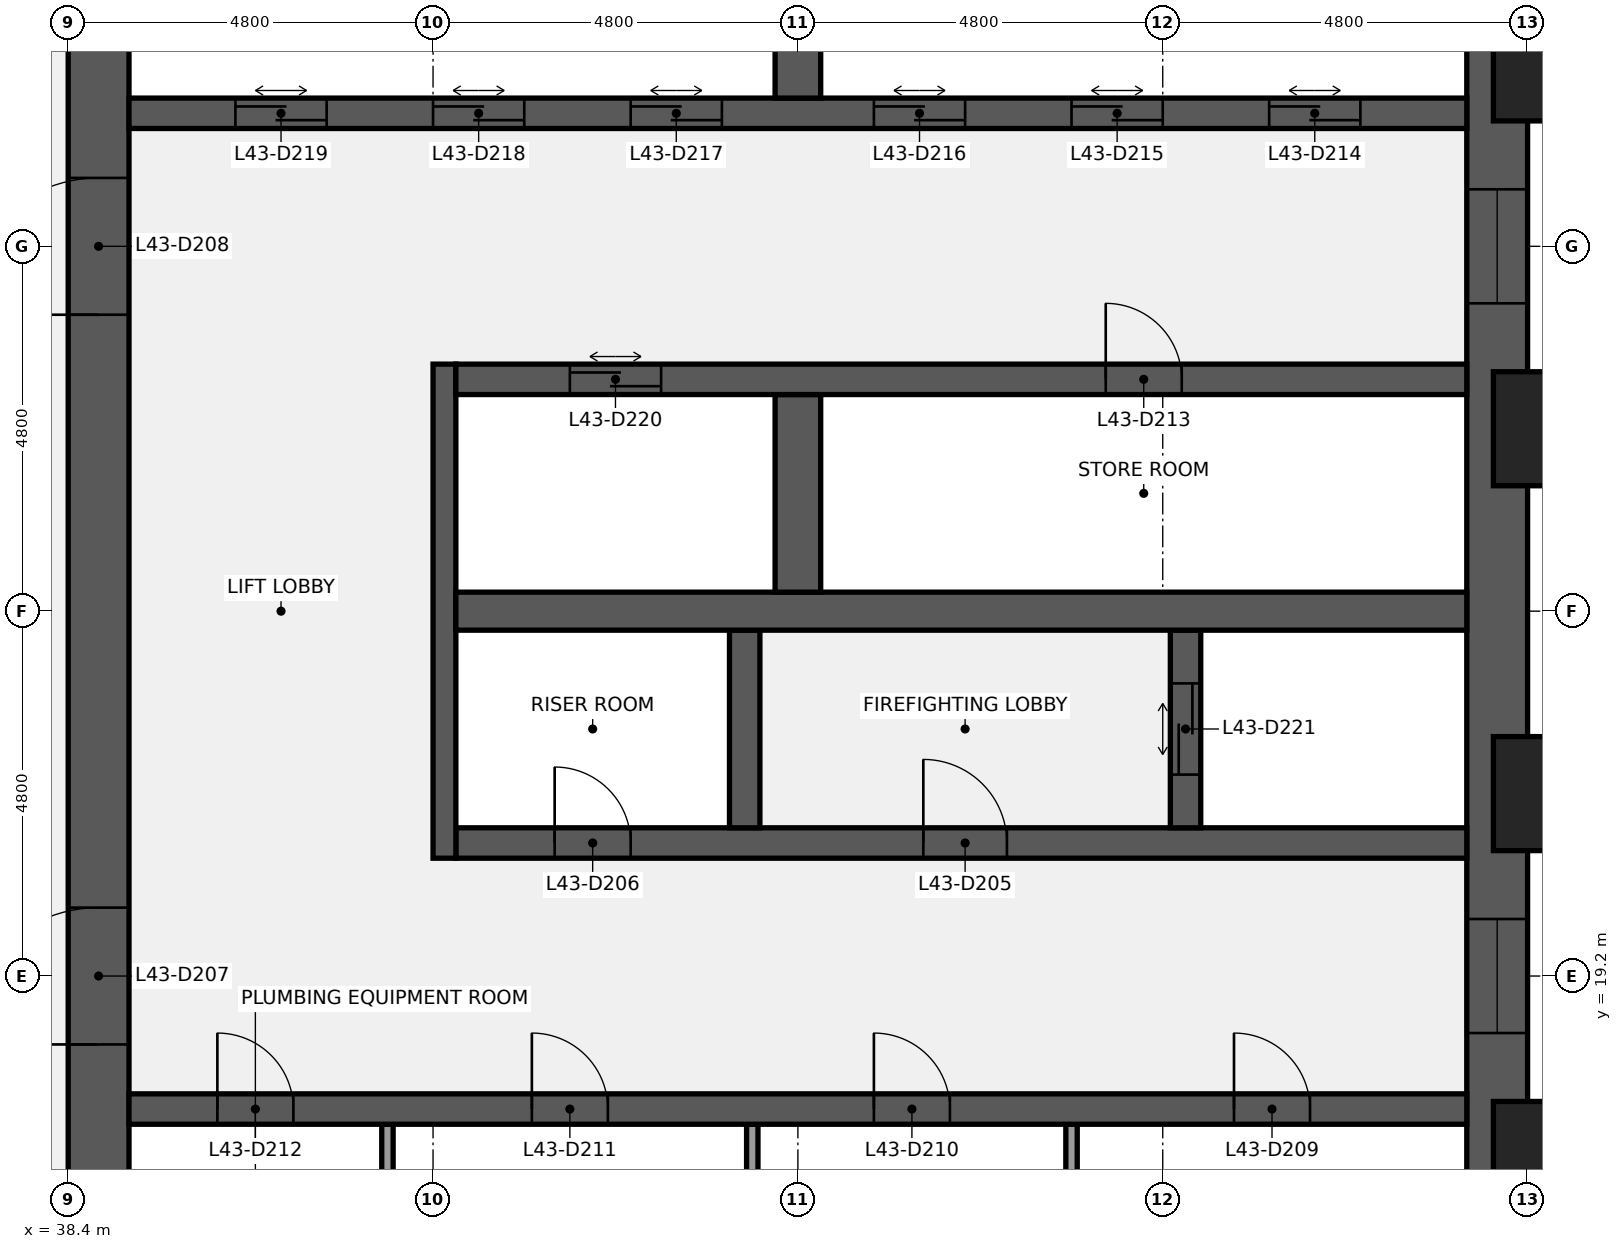
"""IFC4 building model, lengths in metres.
Left out: names, types, materials, properties, quantities, classifications, styles, units other than length and angle.
Written with IfcOpenShell. Run it as: python <this file> out.ifc"""

import sys

from ifc_helpers import new_model, si_unit, direction, frame, frame_2d, origin, origin_2d, place, context, subcontext, project, spatial, rectangle, extrude, element, fill, save


model = new_model("IFC4")
c1 = context("Model", 3, precision=1e-05, world=origin(), true_north=direction((0.0, 1.0)))
c2 = subcontext(c1, "Body", "Model", "MODEL_VIEW")
j1 = project(units=[si_unit("LENGTHUNIT", "METRE"), si_unit("PLANEANGLEUNIT", "RADIAN")], contexts=[c1])
p1 = place(None, origin())
s1 = spatial("IfcSite", under=j1, at=p1, CompositionType="ELEMENT")
p2 = place(p1, origin())
s2 = spatial("IfcBuilding", under=s1, at=p2, CompositionType="ELEMENT")
p3 = place(p2, frame((0.0, 0.0, 201.2)))
s3 = spatial("IfcBuildingStorey", under=s2, at=p3, CompositionType="ELEMENT", Elevation=201.2)
p4 = place(p3, frame((57.2, 38.4, 0.0), z_axis=(0.0, 0.0, 1.0), x_axis=(0.0, -1.0, 0.0)))
e1 = element("IfcWall", 1, at=p4, inside=s3, PredefinedType="SHEAR", context=c2, shape_type="SweptSolid", body=[
    extrude(rectangle(XDim=28.8, YDim=0.8, at=frame_2d((14.4, 0.0))), origin(), (0.0, 0.0, 1.0), 3.84),
])
p5 = place(p4, frame((18.45, 0.0, 0.9)))
e2 = element("IfcOpeningElement", 2, at=p5, cuts=e1, PredefinedType="OPENING", context=c2, shape_type="SweptSolid", body=[
    extrude(rectangle(XDim=1.5, YDim=1.5, at=frame_2d((0.75, 0.75))), frame((0.0, 0.41, 0.0), z_axis=(0.0, -1.0, 0.0), x_axis=(1.0, 0.0, 0.0)), (0.0, 0.0, 1.0), 0.82),
])
p6 = place(p4, frame((8.85, 0.0, 0.9)))
e3 = element("IfcOpeningElement", 3, at=p6, cuts=e1, PredefinedType="OPENING", context=c2, shape_type="SweptSolid", body=[
    extrude(rectangle(XDim=1.5, YDim=1.5, at=frame_2d((0.75, 0.75))), frame((0.0, 0.41, 0.0), z_axis=(0.0, -1.0, 0.0), x_axis=(1.0, 0.0, 0.0)), (0.0, 0.0, 1.0), 0.82),
])
p7 = place(p3, frame((38.8, 9.6, 0.0), z_axis=(0.0, 0.0, 1.0), x_axis=(0.0, 1.0, 0.0)))
e4 = element("IfcWall", 4, at=p7, inside=s3, PredefinedType="SHEAR", context=c2, shape_type="SweptSolid", body=[
    extrude(rectangle(XDim=28.8, YDim=0.8, at=frame_2d((14.4, 0.0))), origin(), (0.0, 0.0, 1.0), 3.84),
])
p8 = place(p7, frame((8.7, 0.0, 0.0)))
e5 = element("IfcOpeningElement", 5, at=p8, cuts=e4, PredefinedType="OPENING", context=c2, shape_type="SweptSolid", body=[
    extrude(rectangle(XDim=1.8, YDim=2.1, at=frame_2d((0.9, 1.05))), frame((0.0, 0.41, 0.0), z_axis=(0.0, -1.0, 0.0), x_axis=(1.0, 0.0, 0.0)), (0.0, 0.0, 1.0), 0.82),
])
p9 = place(p7, frame((18.3, 0.0, 0.0)))
e6 = element("IfcOpeningElement", 6, at=p9, cuts=e4, PredefinedType="OPENING", context=c2, shape_type="SweptSolid", body=[
    extrude(rectangle(XDim=1.8, YDim=2.1, at=frame_2d((0.9, 1.05))), frame((0.0, 0.41, 0.0), z_axis=(0.0, -1.0, 0.0), x_axis=(1.0, 0.0, 0.0)), (0.0, 0.0, 1.0), 0.82),
])
for number, where, z_axis, x_axis in (
    (7, (51.6, 14.65, 0.0), (0.0, 0.0, 1.0), (0.0, 1.0, 0.0)),
    (8, (47.4, 14.65, 0.0), (0.0, 0.0, 1.0), (0.0, 1.0, 0.0)),
    (9, (42.6, 14.65, 0.0), (0.0, 0.0, 1.0), (0.0, 1.0, 0.0)),
):
    element("IfcWall", number, at=place(p3, frame(where, z_axis=z_axis, x_axis=x_axis)), inside=s3, PredefinedType="PARTITIONING", context=c2, shape_type="SweptSolid", body=[
        extrude(rectangle(XDim=2.6, YDim=0.15, at=frame_2d((1.3, 0.0))), origin(), (0.0, 0.0, 1.0), 3.84),
    ])
p10 = place(p3, frame((39.2, 17.45, 0.0), z_axis=(0.0, 0.0, 1.0), x_axis=(1.0, 0.0, 0.0)))
e10 = element("IfcWall", 10, at=p10, inside=s3, PredefinedType="SHEAR", context=c2, shape_type="SweptSolid", body=[
    extrude(rectangle(XDim=17.6, YDim=0.4, at=frame_2d((8.8, 0.0))), origin(), (0.0, 0.0, 1.0), 3.84),
])
p11 = place(p10, frame((14.538, 0.0, 0.0)))
e11 = element("IfcOpeningElement", 11, at=p11, cuts=e10, PredefinedType="OPENING", context=c2, shape_type="SweptSolid", body=[
    extrude(rectangle(XDim=1.0, YDim=2.1, at=frame_2d((0.5, 1.05))), frame((0.0, 0.21, 0.0), z_axis=(0.0, -1.0, 0.0), x_axis=(1.0, 0.0, 0.0)), (0.0, 0.0, 1.0), 0.42),
])
p12 = place(p10, frame((9.8, 0.0, 0.0)))
e12 = element("IfcOpeningElement", 12, at=p12, cuts=e10, PredefinedType="OPENING", context=c2, shape_type="SweptSolid", body=[
    extrude(rectangle(XDim=1.0, YDim=2.1, at=frame_2d((0.5, 1.05))), frame((0.0, 0.21, 0.0), z_axis=(0.0, -1.0, 0.0), x_axis=(1.0, 0.0, 0.0)), (0.0, 0.0, 1.0), 0.42),
])
p13 = place(p10, frame((5.3, 0.0, 0.0)))
e13 = element("IfcOpeningElement", 13, at=p13, cuts=e10, PredefinedType="OPENING", context=c2, shape_type="SweptSolid", body=[
    extrude(rectangle(XDim=1.0, YDim=2.1, at=frame_2d((0.5, 1.05))), frame((0.0, 0.21, 0.0), z_axis=(0.0, -1.0, 0.0), x_axis=(1.0, 0.0, 0.0)), (0.0, 0.0, 1.0), 0.42),
])
p14 = place(p10, frame((1.163, 0.0, 0.0)))
e14 = element("IfcOpeningElement", 14, at=p14, cuts=e10, PredefinedType="OPENING", context=c2, shape_type="SweptSolid", body=[
    extrude(rectangle(XDim=1.0, YDim=2.1, at=frame_2d((0.5, 1.05))), frame((0.0, 0.21, 0.0), z_axis=(0.0, -1.0, 0.0), x_axis=(1.0, 0.0, 0.0)), (0.0, 0.0, 1.0), 0.42),
])
p15 = place(p3, frame((43.5, 20.95, 0.0), z_axis=(0.0, 0.0, 1.0), x_axis=(1.0, 0.0, 0.0)))
e15 = element("IfcWall", 15, at=p15, inside=s3, PredefinedType="SHEAR", context=c2, shape_type="SweptSolid", body=[
    extrude(rectangle(XDim=13.3, YDim=0.4, at=frame_2d((6.65, 0.0))), origin(), (0.0, 0.0, 1.0), 3.84),
])
p16 = place(p15, frame((6.15, 0.0, 0.0)))
e16 = element("IfcOpeningElement", 16, at=p16, cuts=e15, PredefinedType="OPENING", context=c2, shape_type="SweptSolid", body=[
    extrude(rectangle(XDim=1.1, YDim=2.1, at=frame_2d((0.55, 1.05))), frame((0.0, 0.21, 0.0), z_axis=(0.0, -1.0, 0.0), x_axis=(1.0, 0.0, 0.0)), (0.0, 0.0, 1.0), 0.42),
])
p17 = place(p15, frame((1.3, 0.0, 0.0)))
e17 = element("IfcOpeningElement", 17, at=p17, cuts=e15, PredefinedType="OPENING", context=c2, shape_type="SweptSolid", body=[
    extrude(rectangle(XDim=1.0, YDim=2.1, at=frame_2d((0.5, 1.05))), frame((0.0, 0.21, 0.0), z_axis=(0.0, -1.0, 0.0), x_axis=(1.0, 0.0, 0.0)), (0.0, 0.0, 1.0), 0.42),
])
p18 = place(p3, frame((43.35, 20.75, 0.0), z_axis=(0.0, 0.0, 1.0), x_axis=(0.0, 1.0, 0.0)))
e18 = element("IfcWall", 18, at=p18, inside=s3, PredefinedType="SHEAR", context=c2, shape_type="SweptSolid", body=[
    extrude(rectangle(XDim=6.5, YDim=0.3, at=frame_2d((3.25, 0.0))), origin(), (0.0, 0.0, 1.0), 3.84),
])
p19 = place(p3, frame((53.1, 21.15, 0.0), z_axis=(0.0, 0.0, 1.0), x_axis=(0.0, 1.0, 0.0)))
e19 = element("IfcWall", 19, at=p19, inside=s3, PredefinedType="SHEAR", context=c2, shape_type="SweptSolid", body=[
    extrude(rectangle(XDim=2.6, YDim=0.4, at=frame_2d((1.3, 0.0))), origin(), (0.0, 0.0, 1.0), 3.84),
])
p20 = place(p19, frame((0.7, 0.0, 0.0)))
e20 = element("IfcOpeningElement", 20, at=p20, cuts=e19, PredefinedType="OPENING", context=c2, shape_type="SweptSolid", body=[
    extrude(rectangle(XDim=1.2, YDim=2.1, at=frame_2d((0.6, 1.05))), frame((0.0, 0.21, 0.0), z_axis=(0.0, -1.0, 0.0), x_axis=(1.0, 0.0, 0.0)), (0.0, 0.0, 1.0), 0.42),
])
p21 = place(p3, frame((47.3, 21.15, 0.0), z_axis=(0.0, 0.0, 1.0), x_axis=(0.0, 1.0, 0.0)))
e21 = element("IfcWall", 21, at=p21, inside=s3, PredefinedType="SHEAR", context=c2, shape_type="SweptSolid", body=[
    extrude(rectangle(XDim=2.6, YDim=0.4, at=frame_2d((1.3, 0.0))), origin(), (0.0, 0.0, 1.0), 3.84),
])
p22 = place(p3, frame((43.5, 24.0, 0.0), z_axis=(0.0, 0.0, 1.0), x_axis=(1.0, 0.0, 0.0)))
e22 = element("IfcWall", 22, at=p22, inside=s3, PredefinedType="SHEAR", context=c2, shape_type="SweptSolid", body=[
    extrude(rectangle(XDim=13.3, YDim=0.5, at=frame_2d((6.65, 0.0))), origin(), (0.0, 0.0, 1.0), 3.84),
])
p23 = place(p3, frame((48.0, 24.25, 0.0), z_axis=(0.0, 0.0, 1.0), x_axis=(0.0, 1.0, 0.0)))
e23 = element("IfcWall", 23, at=p23, inside=s3, PredefinedType="SHEAR", context=c2, shape_type="SweptSolid", body=[
    extrude(rectangle(XDim=2.6, YDim=0.6, at=frame_2d((1.3, 0.0))), origin(), (0.0, 0.0, 1.0), 3.84),
])
p24 = place(p3, frame((43.5, 27.05, 0.0), z_axis=(0.0, 0.0, 1.0), x_axis=(1.0, 0.0, 0.0)))
e24 = element("IfcWall", 24, at=p24, inside=s3, PredefinedType="SHEAR", context=c2, shape_type="SweptSolid", body=[
    extrude(rectangle(XDim=13.3, YDim=0.4, at=frame_2d((6.65, 0.0))), origin(), (0.0, 0.0, 1.0), 3.84),
])
p25 = place(p24, frame((8.55, 0.0, 0.0)))
e25 = element("IfcOpeningElement", 25, at=p25, cuts=e24, PredefinedType="OPENING", context=c2, shape_type="SweptSolid", body=[
    extrude(rectangle(XDim=1.0, YDim=2.1, at=frame_2d((0.5, 1.05))), frame((0.0, 0.21, 0.0), z_axis=(0.0, -1.0, 0.0), x_axis=(1.0, 0.0, 0.0)), (0.0, 0.0, 1.0), 0.42),
])
p26 = place(p24, frame((1.5, 0.0, 0.0)))
e26 = element("IfcOpeningElement", 26, at=p26, cuts=e24, PredefinedType="OPENING", context=c2, shape_type="SweptSolid", body=[
    extrude(rectangle(XDim=1.2, YDim=2.1, at=frame_2d((0.6, 1.05))), frame((0.0, 0.21, 0.0), z_axis=(0.0, -1.0, 0.0), x_axis=(1.0, 0.0, 0.0)), (0.0, 0.0, 1.0), 0.42),
])
p27 = place(p3, frame((39.2, 30.55, 0.0), z_axis=(0.0, 0.0, 1.0), x_axis=(1.0, 0.0, 0.0)))
e27 = element("IfcWall", 27, at=p27, inside=s3, PredefinedType="SHEAR", context=c2, shape_type="SweptSolid", body=[
    extrude(rectangle(XDim=17.6, YDim=0.4, at=frame_2d((8.8, 0.0))), origin(), (0.0, 0.0, 1.0), 3.84),
])
p28 = place(p27, frame((15.0, 0.0, 0.0)))
e28 = element("IfcOpeningElement", 28, at=p28, cuts=e27, PredefinedType="OPENING", context=c2, shape_type="SweptSolid", body=[
    extrude(rectangle(XDim=1.2, YDim=2.1, at=frame_2d((0.6, 1.05))), frame((0.0, 0.21, 0.0), z_axis=(0.0, -1.0, 0.0), x_axis=(1.0, 0.0, 0.0)), (0.0, 0.0, 1.0), 0.42),
])
p29 = place(p27, frame((12.4, 0.0, 0.0)))
e29 = element("IfcOpeningElement", 29, at=p29, cuts=e27, PredefinedType="OPENING", context=c2, shape_type="SweptSolid", body=[
    extrude(rectangle(XDim=1.2, YDim=2.1, at=frame_2d((0.6, 1.05))), frame((0.0, 0.21, 0.0), z_axis=(0.0, -1.0, 0.0), x_axis=(1.0, 0.0, 0.0)), (0.0, 0.0, 1.0), 0.42),
])
p30 = place(p27, frame((9.8, 0.0, 0.0)))
e30 = element("IfcOpeningElement", 30, at=p30, cuts=e27, PredefinedType="OPENING", context=c2, shape_type="SweptSolid", body=[
    extrude(rectangle(XDim=1.2, YDim=2.1, at=frame_2d((0.6, 1.05))), frame((0.0, 0.21, 0.0), z_axis=(0.0, -1.0, 0.0), x_axis=(1.0, 0.0, 0.0)), (0.0, 0.0, 1.0), 0.42),
])
p31 = place(p27, frame((6.6, 0.0, 0.0)))
e31 = element("IfcOpeningElement", 31, at=p31, cuts=e27, PredefinedType="OPENING", context=c2, shape_type="SweptSolid", body=[
    extrude(rectangle(XDim=1.2, YDim=2.1, at=frame_2d((0.6, 1.05))), frame((0.0, 0.21, 0.0), z_axis=(0.0, -1.0, 0.0), x_axis=(1.0, 0.0, 0.0)), (0.0, 0.0, 1.0), 0.42),
])
p32 = place(p27, frame((4.0, 0.0, 0.0)))
e32 = element("IfcOpeningElement", 32, at=p32, cuts=e27, PredefinedType="OPENING", context=c2, shape_type="SweptSolid", body=[
    extrude(rectangle(XDim=1.2, YDim=2.1, at=frame_2d((0.6, 1.05))), frame((0.0, 0.21, 0.0), z_axis=(0.0, -1.0, 0.0), x_axis=(1.0, 0.0, 0.0)), (0.0, 0.0, 1.0), 0.42),
])
p33 = place(p27, frame((1.4, 0.0, 0.0)))
e33 = element("IfcOpeningElement", 33, at=p33, cuts=e27, PredefinedType="OPENING", context=c2, shape_type="SweptSolid", body=[
    extrude(rectangle(XDim=1.2, YDim=2.1, at=frame_2d((0.6, 1.05))), frame((0.0, 0.21, 0.0), z_axis=(0.0, -1.0, 0.0), x_axis=(1.0, 0.0, 0.0)), (0.0, 0.0, 1.0), 0.42),
])
p34 = place(p3, frame((48.0, 30.75, 0.0), z_axis=(0.0, 0.0, 1.0), x_axis=(0.0, 1.0, 0.0)))
e34 = element("IfcWall", 34, at=p34, inside=s3, PredefinedType="SHEAR", context=c2, shape_type="SweptSolid", body=[
    extrude(rectangle(XDim=2.6, YDim=0.6, at=frame_2d((1.3, 0.0))), origin(), (0.0, 0.0, 1.0), 3.84),
])
for number, where, z_axis, x_axis in (
    (35, (58.35, 16.8, 0.0), (0.0, 0.0, 1.0), (0.0, 1.0, 0.0)),
    (36, (58.35, 21.6, 0.0), (0.0, 0.0, 1.0), (0.0, 1.0, 0.0)),
    (37, (58.35, 26.4, 0.0), (0.0, 0.0, 1.0), (0.0, 1.0, 0.0)),
    (38, (58.35, 31.2, 0.0), (0.0, 0.0, 1.0), (0.0, 1.0, 0.0)),
):
    element("IfcColumn", number, at=place(p3, frame(where, z_axis=z_axis, x_axis=x_axis)), inside=s3, PredefinedType="PILASTER", context=c2, shape_type="SweptSolid", body=[
        extrude(rectangle(XDim=2.4, YDim=1.5, at=origin_2d()), origin(), (0.0, 0.0, 1.0), 4.0),
    ])
p35 = place(p16, origin())
e39 = element("IfcDoor", 39, at=p35, inside=s3, OperationType="SINGLE_SWING_LEFT", PredefinedType="DOOR", context=c2, shape_type="SweptSolid", body=[
    extrude(rectangle(XDim=1.1, YDim=2.1, at=frame_2d((0.55, 1.05))), frame((0.0, 0.025, 0.0), z_axis=(0.0, -1.0, 0.0), x_axis=(1.0, 0.0, 0.0)), (0.0, 0.0, 1.0), 0.05),
])
fill(e16, e39)
p36 = place(p17, origin())
e40 = element("IfcDoor", 40, at=p36, inside=s3, OperationType="SINGLE_SWING_LEFT", PredefinedType="DOOR", context=c2, shape_type="SweptSolid", body=[
    extrude(rectangle(XDim=1.0, YDim=2.1, at=frame_2d((0.5, 1.05))), frame((0.0, 0.025, 0.0), z_axis=(0.0, -1.0, 0.0), x_axis=(1.0, 0.0, 0.0)), (0.0, 0.0, 1.0), 0.05),
])
fill(e17, e40)
p37 = place(p8, origin())
e41 = element("IfcDoor", 41, at=p37, inside=s3, OperationType="DOUBLE_DOOR_SINGLE_SWING", PredefinedType="DOOR", context=c2, shape_type="SweptSolid", body=[
    extrude(rectangle(XDim=1.8, YDim=2.1, at=frame_2d((0.9, 1.05))), frame((0.0, 0.025, 0.0), z_axis=(0.0, -1.0, 0.0), x_axis=(1.0, 0.0, 0.0)), (0.0, 0.0, 1.0), 0.05),
])
fill(e5, e41)
p38 = place(p9, origin())
e42 = element("IfcDoor", 42, at=p38, inside=s3, OperationType="DOUBLE_DOOR_SINGLE_SWING", PredefinedType="DOOR", context=c2, shape_type="SweptSolid", body=[
    extrude(rectangle(XDim=1.8, YDim=2.1, at=frame_2d((0.9, 1.05))), frame((0.0, 0.025, 0.0), z_axis=(0.0, -1.0, 0.0), x_axis=(1.0, 0.0, 0.0)), (0.0, 0.0, 1.0), 0.05),
])
fill(e6, e42)
p39 = place(p11, origin())
e43 = element("IfcDoor", 43, at=p39, inside=s3, OperationType="SINGLE_SWING_LEFT", PredefinedType="DOOR", context=c2, shape_type="SweptSolid", body=[
    extrude(rectangle(XDim=1.0, YDim=2.1, at=frame_2d((0.5, 1.05))), frame((0.0, 0.025, 0.0), z_axis=(0.0, -1.0, 0.0), x_axis=(1.0, 0.0, 0.0)), (0.0, 0.0, 1.0), 0.05),
])
fill(e11, e43)
p40 = place(p12, origin())
e44 = element("IfcDoor", 44, at=p40, inside=s3, OperationType="SINGLE_SWING_LEFT", PredefinedType="DOOR", context=c2, shape_type="SweptSolid", body=[
    extrude(rectangle(XDim=1.0, YDim=2.1, at=frame_2d((0.5, 1.05))), frame((0.0, 0.025, 0.0), z_axis=(0.0, -1.0, 0.0), x_axis=(1.0, 0.0, 0.0)), (0.0, 0.0, 1.0), 0.05),
])
fill(e12, e44)
p41 = place(p13, origin())
e45 = element("IfcDoor", 45, at=p41, inside=s3, OperationType="SINGLE_SWING_LEFT", PredefinedType="DOOR", context=c2, shape_type="SweptSolid", body=[
    extrude(rectangle(XDim=1.0, YDim=2.1, at=frame_2d((0.5, 1.05))), frame((0.0, 0.025, 0.0), z_axis=(0.0, -1.0, 0.0), x_axis=(1.0, 0.0, 0.0)), (0.0, 0.0, 1.0), 0.05),
])
fill(e13, e45)
p42 = place(p14, origin())
e46 = element("IfcDoor", 46, at=p42, inside=s3, OperationType="SINGLE_SWING_LEFT", PredefinedType="DOOR", context=c2, shape_type="SweptSolid", body=[
    extrude(rectangle(XDim=1.0, YDim=2.1, at=frame_2d((0.5, 1.05))), frame((0.0, 0.025, 0.0), z_axis=(0.0, -1.0, 0.0), x_axis=(1.0, 0.0, 0.0)), (0.0, 0.0, 1.0), 0.05),
])
fill(e14, e46)
p43 = place(p25, origin())
e47 = element("IfcDoor", 47, at=p43, inside=s3, OperationType="SINGLE_SWING_LEFT", PredefinedType="DOOR", context=c2, shape_type="SweptSolid", body=[
    extrude(rectangle(XDim=1.0, YDim=2.1, at=frame_2d((0.5, 1.05))), frame((0.0, 0.025, 0.0), z_axis=(0.0, -1.0, 0.0), x_axis=(1.0, 0.0, 0.0)), (0.0, 0.0, 1.0), 0.05),
])
fill(e25, e47)
p44 = place(p28, origin())
e48 = element("IfcDoor", 48, at=p44, inside=s3, OperationType="DOUBLE_DOOR_SLIDING", PredefinedType="DOOR", context=c2, shape_type="SweptSolid", body=[
    extrude(rectangle(XDim=1.2, YDim=2.1, at=frame_2d((0.6, 1.05))), frame((0.0, 0.025, 0.0), z_axis=(0.0, -1.0, 0.0), x_axis=(1.0, 0.0, 0.0)), (0.0, 0.0, 1.0), 0.05),
])
fill(e28, e48)
p45 = place(p29, origin())
e49 = element("IfcDoor", 49, at=p45, inside=s3, OperationType="DOUBLE_DOOR_SLIDING", PredefinedType="DOOR", context=c2, shape_type="SweptSolid", body=[
    extrude(rectangle(XDim=1.2, YDim=2.1, at=frame_2d((0.6, 1.05))), frame((0.0, 0.025, 0.0), z_axis=(0.0, -1.0, 0.0), x_axis=(1.0, 0.0, 0.0)), (0.0, 0.0, 1.0), 0.05),
])
fill(e29, e49)
p46 = place(p30, origin())
e50 = element("IfcDoor", 50, at=p46, inside=s3, OperationType="DOUBLE_DOOR_SLIDING", PredefinedType="DOOR", context=c2, shape_type="SweptSolid", body=[
    extrude(rectangle(XDim=1.2, YDim=2.1, at=frame_2d((0.6, 1.05))), frame((0.0, 0.025, 0.0), z_axis=(0.0, -1.0, 0.0), x_axis=(1.0, 0.0, 0.0)), (0.0, 0.0, 1.0), 0.05),
])
fill(e30, e50)
p47 = place(p31, origin())
e51 = element("IfcDoor", 51, at=p47, inside=s3, OperationType="DOUBLE_DOOR_SLIDING", PredefinedType="DOOR", context=c2, shape_type="SweptSolid", body=[
    extrude(rectangle(XDim=1.2, YDim=2.1, at=frame_2d((0.6, 1.05))), frame((0.0, 0.025, 0.0), z_axis=(0.0, -1.0, 0.0), x_axis=(1.0, 0.0, 0.0)), (0.0, 0.0, 1.0), 0.05),
])
fill(e31, e51)
p48 = place(p32, origin())
e52 = element("IfcDoor", 52, at=p48, inside=s3, OperationType="DOUBLE_DOOR_SLIDING", PredefinedType="DOOR", context=c2, shape_type="SweptSolid", body=[
    extrude(rectangle(XDim=1.2, YDim=2.1, at=frame_2d((0.6, 1.05))), frame((0.0, 0.025, 0.0), z_axis=(0.0, -1.0, 0.0), x_axis=(1.0, 0.0, 0.0)), (0.0, 0.0, 1.0), 0.05),
])
fill(e32, e52)
p49 = place(p33, origin())
e53 = element("IfcDoor", 53, at=p49, inside=s3, OperationType="DOUBLE_DOOR_SLIDING", PredefinedType="DOOR", context=c2, shape_type="SweptSolid", body=[
    extrude(rectangle(XDim=1.2, YDim=2.1, at=frame_2d((0.6, 1.05))), frame((0.0, 0.025, 0.0), z_axis=(0.0, -1.0, 0.0), x_axis=(1.0, 0.0, 0.0)), (0.0, 0.0, 1.0), 0.05),
])
fill(e33, e53)
p50 = place(p26, origin())
e54 = element("IfcDoor", 54, at=p50, inside=s3, OperationType="DOUBLE_DOOR_SLIDING", PredefinedType="DOOR", context=c2, shape_type="SweptSolid", body=[
    extrude(rectangle(XDim=1.2, YDim=2.1, at=frame_2d((0.6, 1.05))), frame((0.0, 0.025, 0.0), z_axis=(0.0, -1.0, 0.0), x_axis=(1.0, 0.0, 0.0)), (0.0, 0.0, 1.0), 0.05),
])
fill(e26, e54)
p51 = place(p20, origin())
e55 = element("IfcDoor", 55, at=p51, inside=s3, OperationType="DOUBLE_DOOR_SLIDING", PredefinedType="DOOR", context=c2, shape_type="SweptSolid", body=[
    extrude(rectangle(XDim=1.2, YDim=2.1, at=frame_2d((0.6, 1.05))), frame((0.0, 0.025, 0.0), z_axis=(0.0, -1.0, 0.0), x_axis=(1.0, 0.0, 0.0)), (0.0, 0.0, 1.0), 0.05),
])
fill(e20, e55)
p52 = place(p5, origin())
e56 = element("IfcWindow", 56, at=p52, inside=s3, PartitioningType="SINGLE_PANEL", PredefinedType="WINDOW", context=c2, shape_type="SweptSolid", body=[
    extrude(rectangle(XDim=1.5, YDim=1.5, at=frame_2d((0.75, 0.75))), frame((0.0, 0.03, 0.0), z_axis=(0.0, -1.0, 0.0), x_axis=(1.0, 0.0, 0.0)), (0.0, 0.0, 1.0), 0.06),
])
fill(e2, e56)
p53 = place(p6, origin())
e57 = element("IfcWindow", 57, at=p53, inside=s3, PartitioningType="SINGLE_PANEL", PredefinedType="WINDOW", context=c2, shape_type="SweptSolid", body=[
    extrude(rectangle(XDim=1.5, YDim=1.5, at=frame_2d((0.75, 0.75))), frame((0.0, 0.03, 0.0), z_axis=(0.0, -1.0, 0.0), x_axis=(1.0, 0.0, 0.0)), (0.0, 0.0, 1.0), 0.06),
])
fill(e3, e57)
save(model, sys.argv[1])
